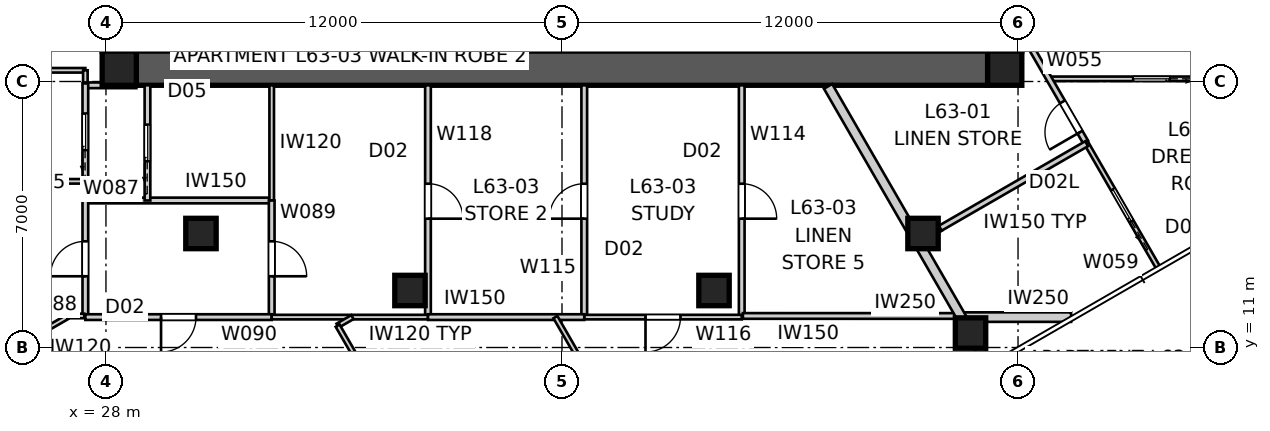
"""IFC4 building model, lengths in metres.
Left out: names, types, materials, properties, quantities, classifications, styles, units other than length and angle.
Written with IfcOpenShell. Run it as: python <this file> out.ifc"""

import sys

from ifc_helpers import new_model, si_unit, direction, frame, frame_2d, origin, origin_2d, place, context, subcontext, project, spatial, polyline, rectangle, outline, extrude, element, fill, save


model = new_model("IFC4")
c1 = context("Model", 3, precision=1e-05, world=origin(), true_north=direction((0.0, 1.0)))
c2 = subcontext(c1, "Body", "Model", "MODEL_VIEW")
j1 = project(units=[si_unit("LENGTHUNIT", "METRE"), si_unit("PLANEANGLEUNIT", "RADIAN")], contexts=[c1])
p1 = place(None, origin())
s1 = spatial("IfcSite", under=j1, at=p1, CompositionType="ELEMENT")
p2 = place(p1, origin())
s2 = spatial("IfcBuilding", under=s1, at=p2, CompositionType="ELEMENT")
p3 = place(p2, frame((0.0, 0.0, 228.6)))
s3 = spatial("IfcBuildingStorey", under=s2, at=p3, CompositionType="ELEMENT", Elevation=228.6)
p4 = place(p3, frame((51.2, 18.35, 0.0), z_axis=(0.0, 0.0, 1.0), x_axis=(-1.0, 0.0, 0.0)))
e1 = element("IfcWall", 1, at=p4, inside=s3, PredefinedType="SHEAR", context=c2, shape_type="SweptSolid", body=[
    extrude(outline(polyline([(0.0, -0.45), (22.4, -0.45), (22.4, -0.025), (22.85, -0.025), (22.85, 0.025), (22.4, 0.025), (22.4, 0.45), (0.0, 0.45), (0.0, 0.025), (-0.45, 0.025), (-0.45, -0.025), (0.0, -0.025), (0.0, -0.45)])), origin(), (0.0, 0.0, 1.0), 3.4),
])
p5 = place(p3, frame((51.65, 18.8, 0.0), z_axis=(0.0, 0.0, 1.0), x_axis=(0.0, 1.0, 0.0)))
e2 = element("IfcWall", 2, at=p5, inside=s3, PredefinedType="SHEAR", context=c2, shape_type="SweptSolid", body=[
    extrude(outline(polyline([(0.0, -0.45), (22.4, -0.45), (22.4, -0.025), (22.85, -0.025), (22.85, 0.025), (22.4, 0.025), (22.4, 0.45), (0.0, 0.45), (0.0, 0.025), (-0.45, 0.025), (-0.45, -0.025), (0.0, -0.025), (0.0, -0.45)])), origin(), (0.0, 0.0, 1.0), 3.4),
])
p6 = place(p5, frame((11.14, 0.0, 0.0)))
e3 = element("IfcOpeningElement", 3, at=p6, cuts=e2, PredefinedType="OPENING", context=c2, shape_type="SweptSolid", body=[
    extrude(rectangle(XDim=1.02, YDim=2.4, at=frame_2d((0.51, 1.2))), frame((0.0, 0.46, 0.0), z_axis=(0.0, -1.0, 0.0), x_axis=(1.0, 0.0, 0.0)), (0.0, 0.0, 1.0), 0.92),
])
p7 = place(p3, frame((28.35, 41.2, 0.0), z_axis=(0.0, 0.0, 1.0), x_axis=(0.0, -1.0, 0.0)))
e4 = element("IfcWall", 4, at=p7, inside=s3, PredefinedType="SHEAR", context=c2, shape_type="SweptSolid", body=[
    extrude(outline(polyline([(0.0, -0.45), (22.4, -0.45), (22.4, -0.025), (22.85, -0.025), (22.85, 0.025), (22.4, 0.025), (22.4, 0.45), (0.0, 0.45), (0.0, 0.025), (-0.45, 0.025), (-0.45, -0.025), (0.0, -0.025), (0.0, -0.45)])), origin(), (0.0, 0.0, 1.0), 3.4),
])
p8 = place(p7, frame((11.14, 0.0, 0.0)))
e5 = element("IfcOpeningElement", 5, at=p8, cuts=e4, PredefinedType="OPENING", context=c2, shape_type="SweptSolid", body=[
    extrude(rectangle(XDim=1.02, YDim=2.4, at=frame_2d((0.51, 1.2))), frame((0.0, 0.46, 0.0), z_axis=(0.0, -1.0, 0.0), x_axis=(1.0, 0.0, 0.0)), (0.0, 0.0, 1.0), 0.92),
])
for number, where, z_axis, x_axis in (
    (6, (28.35, 18.35, 0.0), (0.0, 0.0, 1.0), (1.0, 0.0, 0.0)),
    (7, (51.65, 18.35, 0.0), (0.0, 0.0, 1.0), (1.0, 0.0, 0.0)),
):
    element("IfcColumn", number, at=place(p3, frame(where, z_axis=z_axis, x_axis=x_axis)), inside=s3, PredefinedType="COLUMN", context=c2, shape_type="SweptSolid", body=[
        extrude(rectangle(XDim=0.9, YDim=0.9, at=origin_2d()), origin(), (0.0, 0.0, 1.0), 3.4),
    ])
for number, where, z_axis, x_axis in (
    (8, (50.75, 11.38, 0.0), (0.0, 0.0, 1.0), (1.0, 0.0, 0.0)),
    (9, (30.5, 14.0, 0.0), (0.0, 0.0, 1.0), (1.0, 0.0, 0.0)),
    (10, (36.0, 12.5, 0.0), (0.0, 0.0, 1.0), (1.0, 0.0, 0.0)),
    (11, (44.0, 12.5, 0.0), (0.0, 0.0, 1.0), (1.0, 0.0, 0.0)),
    (12, (49.5, 14.0, 0.0), (0.0, 0.0, 1.0), (1.0, 0.0, 0.0)),
):
    element("IfcColumn", number, at=place(p3, frame(where, z_axis=z_axis, x_axis=x_axis)), inside=s3, PredefinedType="COLUMN", context=c2, shape_type="SweptSolid", body=[
        extrude(rectangle(XDim=0.8, YDim=0.8, at=origin_2d()), origin(), (0.0, 0.0, 1.0), 3.4),
    ])
p9 = place(p3, frame((51.25, 10.514, 0.0), z_axis=(0.0, 0.0, 1.0), x_axis=(-0.500008511703, 0.866020489494, 0.0)))
e13 = element("IfcWall", 13, at=p9, inside=s3, PredefinedType="PARTITIONING", context=c2, shape_type="SweptSolid", body=[
    extrude(rectangle(XDim=8.496, YDim=0.25, at=frame_2d((4.248, 0.0))), origin(), (0.0, 0.0, 1.0), 3.25),
])
p10 = place(p3, frame((58.2, 18.07, 0.0), z_axis=(0.0, 0.0, 1.0), x_axis=(-1.0, 0.0, 0.0)))
e14 = element("IfcWall", 14, at=p10, inside=s3, PredefinedType="PARTITIONING", context=c2, shape_type="SweptSolid", body=[
    extrude(rectangle(XDim=5.381, YDim=0.12, at=frame_2d((2.691, 0.0))), origin(), (0.0, 0.0, 1.0), 3.25),
])
p11 = place(p10, frame((2.211, 0.0, 0.0)))
e15 = element("IfcOpeningElement", 15, at=p11, cuts=e14, PredefinedType="OPENING", context=c2, shape_type="SweptSolid", body=[
    extrude(rectangle(XDim=0.96, YDim=2.1, at=frame_2d((0.48, 1.05))), frame((0.0, 0.07, 0.0), z_axis=(0.0, -1.0, 0.0), x_axis=(1.0, 0.0, 0.0)), (0.0, 0.0, 1.0), 0.14),
])
p12 = place(p3, frame((53.779, 16.406, 0.0), z_axis=(0.0, 0.0, 1.0), x_axis=(-0.499969954228, 0.866042750024, 0.0)))
e16 = element("IfcWall", 16, at=p12, inside=s3, PredefinedType="SOLIDWALL", context=c2, shape_type="SweptSolid", body=[
    extrude(rectangle(XDim=3.359, YDim=0.15, at=frame_2d((1.679, 0.0))), origin(), (0.0, 0.0, 1.0), 3.25),
])
p13 = place(p12, frame((0.301, 0.0, 0.0)))
e17 = element("IfcOpeningElement", 17, at=p13, cuts=e16, PredefinedType="OPENING", context=c2, shape_type="SweptSolid", body=[
    extrude(rectangle(XDim=0.92, YDim=2.1, at=frame_2d((0.46, 1.05))), frame((0.0, 0.085, 0.0), z_axis=(0.0, -1.0, 0.0), x_axis=(1.0, 0.0, 0.0)), (0.0, 0.0, 1.0), 0.17),
])
p14 = place(p3, frame((55.678, 13.117, 0.0), z_axis=(0.0, 0.0, 1.0), x_axis=(-0.500024807712, 0.866011080572, 0.0)))
e18 = element("IfcWall", 18, at=p14, inside=s3, PredefinedType="PARTITIONING", context=c2, shape_type="SweptSolid", body=[
    extrude(rectangle(XDim=3.798, YDim=0.12, at=frame_2d((1.899, 0.0))), origin(), (0.0, 0.0, 1.0), 3.25),
])
p15 = place(p14, frame((1.399, 0.0, 0.0)))
e19 = element("IfcOpeningElement", 19, at=p15, cuts=e18, PredefinedType="OPENING", context=c2, shape_type="SweptSolid", body=[
    extrude(rectangle(XDim=0.96, YDim=2.1, at=frame_2d((0.48, 1.05))), frame((0.0, 0.07, 0.0), z_axis=(0.0, -1.0, 0.0), x_axis=(1.0, 0.0, 0.0)), (0.0, 0.0, 1.0), 0.14),
])
p16 = place(p3, frame((49.356, 13.795, 0.0), z_axis=(0.0, 0.0, 1.0), x_axis=(0.866038486578, 0.499977339252, 0.0)))
e20 = element("IfcWall", 20, at=p16, inside=s3, PredefinedType="SOLIDWALL", context=c2, shape_type="SweptSolid", body=[
    extrude(rectangle(XDim=0.691, YDim=0.15, at=frame_2d((0.345, 0.0))), origin(), (0.0, 0.0, 1.0), 2.25),
])
p17 = place(p3, frame((49.955, 14.14, 0.0), z_axis=(0.0, 0.0, 1.0), x_axis=(0.866017295027, 0.500014044516, 0.0)))
e21 = element("IfcWall", 21, at=p17, inside=s3, PredefinedType="SOLIDWALL", context=c2, shape_type="SweptSolid", body=[
    extrude(rectangle(XDim=4.445, YDim=0.15, at=frame_2d((2.223, 0.0))), origin(), (0.0, 0.0, 1.0), 3.25),
])
p18 = place(p3, frame((53.397, 11.8, 0.0), z_axis=(0.0, 0.0, 1.0), x_axis=(-1.0, 0.0, 0.0)))
e22 = element("IfcWall", 22, at=p18, inside=s3, PredefinedType="PARTITIONING", context=c2, shape_type="SweptSolid", body=[
    extrude(rectangle(XDim=2.889, YDim=0.25, at=frame_2d((1.444, 0.0))), origin(), (0.0, 0.0, 1.0), 3.25),
])
p19 = place(p3, frame((27.458, 18.295, 0.0), z_axis=(0.0, 0.0, 1.0), x_axis=(-1.0, 0.0, 0.0)))
e23 = element("IfcWall", 23, at=p19, inside=s3, PredefinedType="PARTITIONING", context=c2, shape_type="SweptSolid", body=[
    extrude(rectangle(XDim=5.658, YDim=0.12, at=frame_2d((2.829, 0.0))), origin(), (0.0, 0.0, 1.0), 3.25),
])
p20 = place(p3, frame((28.8, 17.9, 0.0), z_axis=(0.0, 0.0, 1.0), x_axis=(-1.0, 0.0, 0.0)))
e24 = element("IfcWall", 24, at=p20, inside=s3, PredefinedType="SOLIDWALL", context=c2, shape_type="SweptSolid", body=[
    extrude(rectangle(XDim=1.342, YDim=0.15, at=frame_2d((0.671, 0.0))), origin(), (0.0, 0.0, 1.0), 3.25),
])
p21 = place(p3, frame((32.361, 14.869, 0.0), z_axis=(0.0, 0.0, 1.0), x_axis=(-1.0, 0.0, 0.0)))
e25 = element("IfcWall", 25, at=p21, inside=s3, PredefinedType="SOLIDWALL", context=c2, shape_type="SweptSolid", body=[
    extrude(rectangle(XDim=4.903, YDim=0.15, at=frame_2d((2.452, 0.0))), origin(), (0.0, 0.0, 1.0), 3.25),
])
p22 = place(p3, frame((32.361, 17.9, 0.0), z_axis=(0.0, 0.0, 1.0), x_axis=(0.0, -1.0, 0.0)))
e26 = element("IfcWall", 26, at=p22, inside=s3, PredefinedType="PARTITIONING", context=c2, shape_type="SweptSolid", body=[
    extrude(rectangle(XDim=3.031, YDim=0.12, at=frame_2d((1.516, 0.0))), origin(), (0.0, 0.0, 1.0), 3.25),
])
p23 = place(p3, frame((29.092, 14.869, 0.0), z_axis=(0.0, 0.0, 1.0), x_axis=(0.0, 1.0, 0.0)))
e27 = element("IfcWall", 27, at=p23, inside=s3, PredefinedType="SOLIDWALL", context=c2, shape_type="SweptSolid", body=[
    extrude(rectangle(XDim=3.031, YDim=0.15, at=frame_2d((1.516, 0.0))), origin(), (0.0, 0.0, 1.0), 3.25),
])
p24 = place(p23, frame((1.036, 0.0, 0.0)))
e28 = element("IfcOpeningElement", 28, at=p24, cuts=e27, PredefinedType="OPENING", context=c2, shape_type="SweptSolid", body=[
    extrude(rectangle(XDim=0.96, YDim=2.1, at=frame_2d((0.48, 1.05))), frame((0.0, 0.085, 0.0), z_axis=(0.0, -1.0, 0.0), x_axis=(1.0, 0.0, 0.0)), (0.0, 0.0, 1.0), 0.17),
])
p25 = place(p3, frame((27.458, 11.8, 0.0), z_axis=(0.0, 0.0, 1.0), x_axis=(0.0, 1.0, 0.0)))
e29 = element("IfcWall", 29, at=p25, inside=s3, PredefinedType="SOLIDWALL", context=c2, shape_type="SweptSolid", body=[
    extrude(rectangle(XDim=6.15, YDim=0.15, at=frame_2d((3.075, 0.0))), origin(), (0.0, 0.0, 1.0), 3.25),
])
p26 = place(p25, frame((4.396, 0.0, 0.0)))
e30 = element("IfcOpeningElement", 30, at=p26, cuts=e29, PredefinedType="OPENING", context=c2, shape_type="SweptSolid", body=[
    extrude(rectangle(XDim=0.96, YDim=2.1, at=frame_2d((0.48, 1.05))), frame((0.0, 0.085, 0.0), z_axis=(0.0, -1.0, 0.0), x_axis=(1.0, 0.0, 0.0)), (0.0, 0.0, 1.0), 0.17),
])
p27 = place(p25, frame((1.074, 0.0, 0.0)))
e31 = element("IfcOpeningElement", 31, at=p27, cuts=e29, PredefinedType="OPENING", context=c2, shape_type="SweptSolid", body=[
    extrude(rectangle(XDim=0.92, YDim=2.34, at=frame_2d((0.46, 1.17))), frame((0.0, 0.085, 0.0), z_axis=(0.0, -1.0, 0.0), x_axis=(1.0, 0.0, 0.0)), (0.0, 0.0, 1.0), 0.17),
])
p28 = place(p3, frame((32.361, 14.869, 0.0), z_axis=(0.0, 0.0, 1.0), x_axis=(0.0, -1.0, 0.0)))
e32 = element("IfcWall", 32, at=p28, inside=s3, PredefinedType="SOLIDWALL", context=c2, shape_type="SweptSolid", body=[
    extrude(rectangle(XDim=3.069, YDim=0.15, at=frame_2d((1.534, 0.0))), origin(), (0.0, 0.0, 1.0), 3.25),
])
p29 = place(p28, frame((1.074, 0.0, 0.0)))
e33 = element("IfcOpeningElement", 33, at=p29, cuts=e32, PredefinedType="OPENING", context=c2, shape_type="SweptSolid", body=[
    extrude(rectangle(XDim=0.92, YDim=2.34, at=frame_2d((0.46, 1.17))), frame((0.0, 0.085, 0.0), z_axis=(0.0, -1.0, 0.0), x_axis=(1.0, 0.0, 0.0)), (0.0, 0.0, 1.0), 0.17),
])
p30 = place(p3, frame((32.361, 11.8, 0.0), z_axis=(0.0, 0.0, 1.0), x_axis=(-1.0, 0.0, 0.0)))
e34 = element("IfcWall", 34, at=p30, inside=s3, PredefinedType="SOLIDWALL", context=c2, shape_type="SweptSolid", body=[
    extrude(rectangle(XDim=4.903, YDim=0.15, at=frame_2d((2.452, 0.0))), origin(), (0.0, 0.0, 1.0), 3.25),
])
p31 = place(p30, frame((1.992, 0.0, 0.0)))
e35 = element("IfcOpeningElement", 35, at=p31, cuts=e34, PredefinedType="OPENING", context=c2, shape_type="SweptSolid", body=[
    extrude(rectangle(XDim=0.92, YDim=2.34, at=frame_2d((0.46, 1.17))), frame((0.0, 0.085, 0.0), z_axis=(0.0, -1.0, 0.0), x_axis=(1.0, 0.0, 0.0)), (0.0, 0.0, 1.0), 0.17),
])
p32 = place(p3, frame((22.51, 15.373, 0.0), z_axis=(0.0, 0.0, 1.0), x_axis=(1.0, 0.0, 0.0)))
e36 = element("IfcWall", 36, at=p32, inside=s3, PredefinedType="PARTITIONING", context=c2, shape_type="SweptSolid", body=[
    extrude(rectangle(XDim=4.918, YDim=0.12, at=frame_2d((2.459, 0.0))), origin(), (0.0, 0.0, 1.0), 3.25),
])
p33 = place(p32, frame((1.973, 0.0, 0.0)))
e37 = element("IfcOpeningElement", 37, at=p33, cuts=e36, PredefinedType="OPENING", context=c2, shape_type="SweptSolid", body=[
    extrude(rectangle(XDim=0.96, YDim=2.1, at=frame_2d((0.48, 1.05))), frame((0.0, 0.07, 0.0), z_axis=(0.0, -1.0, 0.0), x_axis=(1.0, 0.0, 0.0)), (0.0, 0.0, 1.0), 0.14),
])
p34 = place(p3, frame((27.428, 11.83, 0.0), z_axis=(0.0, 0.0, 1.0), x_axis=(-1.0, 0.0, 0.0)))
e38 = element("IfcWall", 38, at=p34, inside=s3, PredefinedType="PARTITIONING", context=c2, shape_type="SweptSolid", body=[
    extrude(rectangle(XDim=0.421, YDim=0.12, at=frame_2d((0.211, 0.0))), origin(), (0.0, 0.0, 1.0), 3.25),
])
p35 = place(p3, frame((26.976, 11.8, 0.0), z_axis=(0.0, 0.0, 1.0), x_axis=(-0.866046860819, -0.499962833484, 0.0)))
e39 = element("IfcWall", 39, at=p35, inside=s3, PredefinedType="PARTITIONING", context=c2, shape_type="SweptSolid", body=[
    extrude(rectangle(XDim=2.081, YDim=0.12, at=frame_2d((1.041, 0.0))), origin(), (0.0, 0.0, 1.0), 3.25),
])
p36 = place(p3, frame((44.729, 17.9, 0.0), z_axis=(0.0, 0.0, 1.0), x_axis=(0.0, -1.0, 0.0)))
e40 = element("IfcWall", 40, at=p36, inside=s3, PredefinedType="SOLIDWALL", context=c2, shape_type="SweptSolid", body=[
    extrude(rectangle(XDim=6.1, YDim=0.15, at=frame_2d((3.05, 0.0))), origin(), (0.0, 0.0, 1.0), 3.25),
])
p37 = place(p36, frame((2.59, 0.0, 0.0)))
e41 = element("IfcOpeningElement", 41, at=p37, cuts=e40, PredefinedType="OPENING", context=c2, shape_type="SweptSolid", body=[
    extrude(rectangle(XDim=0.92, YDim=2.34, at=frame_2d((0.46, 1.17))), frame((0.0, 0.085, 0.0), z_axis=(0.0, -1.0, 0.0), x_axis=(1.0, 0.0, 0.0)), (0.0, 0.0, 1.0), 0.17),
])
p38 = place(p3, frame((40.586, 11.8, 0.0), z_axis=(0.0, 0.0, 1.0), x_axis=(0.0, 1.0, 0.0)))
e42 = element("IfcWall", 42, at=p38, inside=s3, PredefinedType="SOLIDWALL", context=c2, shape_type="SweptSolid", body=[
    extrude(rectangle(XDim=6.1, YDim=0.15, at=frame_2d((3.05, 0.0))), origin(), (0.0, 0.0, 1.0), 3.25),
])
p39 = place(p38, frame((2.59, 0.0, 0.0)))
e43 = element("IfcOpeningElement", 43, at=p39, cuts=e42, PredefinedType="OPENING", context=c2, shape_type="SweptSolid", body=[
    extrude(rectangle(XDim=0.92, YDim=2.34, at=frame_2d((0.46, 1.17))), frame((0.0, 0.085, 0.0), z_axis=(0.0, -1.0, 0.0), x_axis=(1.0, 0.0, 0.0)), (0.0, 0.0, 1.0), 0.17),
])
p40 = place(p3, frame((44.729, 11.8, 0.0), z_axis=(0.0, 0.0, 1.0), x_axis=(-1.0, 0.0, 0.0)))
e44 = element("IfcWall", 44, at=p40, inside=s3, PredefinedType="PARTITIONING", context=c2, shape_type="SweptSolid", body=[
    extrude(rectangle(XDim=4.144, YDim=0.12, at=frame_2d((2.072, 0.0))), origin(), (0.0, 0.0, 1.0), 3.25),
])
p41 = place(p40, frame((1.612, 0.0, 0.0)))
e45 = element("IfcOpeningElement", 45, at=p41, cuts=e44, PredefinedType="OPENING", context=c2, shape_type="SweptSolid", body=[
    extrude(rectangle(XDim=0.92, YDim=2.34, at=frame_2d((0.46, 1.17))), frame((0.0, 0.07, 0.0), z_axis=(0.0, -1.0, 0.0), x_axis=(1.0, 0.0, 0.0)), (0.0, 0.0, 1.0), 0.14),
])
p42 = place(p3, frame((50.491, 11.829, 0.0), z_axis=(0.0, 0.0, 1.0), x_axis=(-0.999999991834, 0.000127795526, 0.0)))
e46 = element("IfcWall", 46, at=p42, inside=s3, PredefinedType="SOLIDWALL", context=c2, shape_type="SweptSolid", body=[
    extrude(rectangle(XDim=5.731, YDim=0.15, at=frame_2d((2.866, 0.0))), origin(), (0.0, 0.0, 1.0), 3.25),
])
p43 = place(p3, frame((36.474, 17.9, 0.0), z_axis=(0.0, 0.0, 1.0), x_axis=(0.0, -1.0, 0.0)))
e47 = element("IfcWall", 47, at=p43, inside=s3, PredefinedType="SOLIDWALL", context=c2, shape_type="SweptSolid", body=[
    extrude(rectangle(XDim=6.1, YDim=0.15, at=frame_2d((3.05, 0.0))), origin(), (0.0, 0.0, 1.0), 3.25),
])
p44 = place(p43, frame((2.59, 0.0, 0.0)))
e48 = element("IfcOpeningElement", 48, at=p44, cuts=e47, PredefinedType="OPENING", context=c2, shape_type="SweptSolid", body=[
    extrude(rectangle(XDim=0.92, YDim=2.34, at=frame_2d((0.46, 1.17))), frame((0.0, 0.085, 0.0), z_axis=(0.0, -1.0, 0.0), x_axis=(1.0, 0.0, 0.0)), (0.0, 0.0, 1.0), 0.17),
])
p45 = place(p3, frame((36.474, 11.8, 0.0), z_axis=(0.0, 0.0, 1.0), x_axis=(-1.0, 0.0, 0.0)))
e49 = element("IfcWall", 49, at=p45, inside=s3, PredefinedType="PARTITIONING", context=c2, shape_type="SweptSolid", body=[
    extrude(rectangle(XDim=4.112, YDim=0.12, at=frame_2d((2.056, 0.0))), origin(), (0.0, 0.0, 1.0), 3.25),
])
p46 = place(p3, frame((40.586, 11.8, 0.0), z_axis=(0.0, 0.0, 1.0), x_axis=(-1.0, 0.0, 0.0)))
e50 = element("IfcWall", 50, at=p46, inside=s3, PredefinedType="SOLIDWALL", context=c2, shape_type="SweptSolid", body=[
    extrude(rectangle(XDim=4.112, YDim=0.15, at=frame_2d((2.056, 0.0))), origin(), (0.0, 0.0, 1.0), 3.25),
])
p47 = place(p3, frame((34.486, 11.8, 0.0), z_axis=(0.0, 0.0, 1.0), x_axis=(-0.865896406789, -0.500223362819, 0.0)))
e51 = element("IfcWall", 51, at=p47, inside=s3, PredefinedType="PARTITIONING", context=c2, shape_type="SweptSolid", body=[
    extrude(rectangle(XDim=0.45, YDim=0.12, at=frame_2d((0.225, 0.0))), origin(), (0.0, 0.0, 1.0), 3.25),
])
p48 = place(p3, frame((34.097, 11.575, 0.0), z_axis=(0.0, 0.0, 1.0), x_axis=(0.49999364752, -0.86602907136, 0.0)))
e52 = element("IfcWall", 52, at=p48, inside=s3, PredefinedType="PARTITIONING", context=c2, shape_type="SweptSolid", body=[
    extrude(rectangle(XDim=9.455, YDim=0.12, at=frame_2d((4.728, 0.0))), origin(), (0.0, 0.0, 1.0), 3.25),
])
p49 = place(p48, frame((4.288, 0.0, 0.0)))
e53 = element("IfcOpeningElement", 53, at=p49, cuts=e52, PredefinedType="OPENING", context=c2, shape_type="SweptSolid", body=[
    extrude(rectangle(XDim=0.92, YDim=2.34, at=frame_2d((0.46, 1.17))), frame((0.0, 0.07, 0.0), z_axis=(0.0, -1.0, 0.0), x_axis=(1.0, 0.0, 0.0)), (0.0, 0.0, 1.0), 0.14),
])
p50 = place(p3, frame((43.219, 5.924, 0.0), z_axis=(0.0, 0.0, 1.0), x_axis=(-0.500009005995, 0.866020204108, 0.0)))
e54 = element("IfcWall", 54, at=p50, inside=s3, PredefinedType="PARTITIONING", context=c2, shape_type="SweptSolid", body=[
    extrude(rectangle(XDim=6.785, YDim=0.12, at=frame_2d((3.393, 0.0))), origin(), (0.0, 0.0, 1.0), 3.25),
])
p51 = place(p3, frame((27.458, 18.295, 0.0), z_axis=(0.0, 0.0, 1.0), x_axis=(0.0, -1.0, 0.0)))
e55 = element("IfcWall", 55, at=p51, inside=s3, PredefinedType="PARTITIONING", context=c2, shape_type="SweptSolid", body=[
    extrude(rectangle(XDim=0.345, YDim=0.12, at=frame_2d((0.172, 0.0))), origin(), (0.0, 0.0, 1.0), 3.25),
])
p52 = place(p11, origin())
e56 = element("IfcDoor", 56, at=p52, inside=s3, OperationType="SLIDING_TO_LEFT", PredefinedType="DOOR", context=c2, shape_type="SweptSolid", body=[
    extrude(rectangle(XDim=0.96, YDim=2.1, at=frame_2d((0.48, 1.05))), frame((0.0, 0.025, 0.0), z_axis=(0.0, -1.0, 0.0), x_axis=(1.0, 0.0, 0.0)), (0.0, 0.0, 1.0), 0.05),
])
fill(e15, e56)
p53 = place(p15, origin())
e57 = element("IfcDoor", 57, at=p53, inside=s3, OperationType="SLIDING_TO_LEFT", PredefinedType="DOOR", context=c2, shape_type="SweptSolid", body=[
    extrude(rectangle(XDim=0.96, YDim=2.1, at=frame_2d((0.48, 1.05))), frame((0.0, 0.025, 0.0), z_axis=(0.0, -1.0, 0.0), x_axis=(1.0, 0.0, 0.0)), (0.0, 0.0, 1.0), 0.05),
])
fill(e19, e57)
p54 = place(p13, origin())
e58 = element("IfcDoor", 58, at=p54, inside=s3, OperationType="SINGLE_SWING_LEFT", PredefinedType="DOOR", context=c2, shape_type="SweptSolid", body=[
    extrude(rectangle(XDim=0.92, YDim=2.1, at=frame_2d((0.46, 1.05))), frame((0.0, 0.025, 0.0), z_axis=(0.0, -1.0, 0.0), x_axis=(1.0, 0.0, 0.0)), (0.0, 0.0, 1.0), 0.05),
])
fill(e17, e58)
p55 = place(p26, origin())
e59 = element("IfcDoor", 59, at=p55, inside=s3, OperationType="SLIDING_TO_LEFT", PredefinedType="DOOR", context=c2, shape_type="SweptSolid", body=[
    extrude(rectangle(XDim=0.96, YDim=2.1, at=frame_2d((0.48, 1.05))), frame((0.0, 0.025, 0.0), z_axis=(0.0, -1.0, 0.0), x_axis=(1.0, 0.0, 0.0)), (0.0, 0.0, 1.0), 0.05),
])
fill(e30, e59)
p56 = place(p27, origin())
e60 = element("IfcDoor", 60, at=p56, inside=s3, OperationType="SINGLE_SWING_LEFT", PredefinedType="DOOR", context=c2, shape_type="SweptSolid", body=[
    extrude(rectangle(XDim=0.92, YDim=2.34, at=frame_2d((0.46, 1.17))), frame((0.0, 0.025, 0.0), z_axis=(0.0, -1.0, 0.0), x_axis=(1.0, 0.0, 0.0)), (0.0, 0.0, 1.0), 0.05),
])
fill(e31, e60)
p57 = place(p24, origin())
e61 = element("IfcDoor", 61, at=p57, inside=s3, OperationType="SLIDING_TO_LEFT", PredefinedType="DOOR", context=c2, shape_type="SweptSolid", body=[
    extrude(rectangle(XDim=0.96, YDim=2.1, at=frame_2d((0.48, 1.05))), frame((0.0, 0.025, 0.0), z_axis=(0.0, -1.0, 0.0), x_axis=(1.0, 0.0, 0.0)), (0.0, 0.0, 1.0), 0.05),
])
fill(e28, e61)
p58 = place(p31, origin())
e62 = element("IfcDoor", 62, at=p58, inside=s3, OperationType="SINGLE_SWING_RIGHT", PredefinedType="DOOR", context=c2, shape_type="SweptSolid", body=[
    extrude(rectangle(XDim=0.92, YDim=2.34, at=frame_2d((0.46, 1.17))), frame((0.0, 0.025, 0.0), z_axis=(0.0, -1.0, 0.0), x_axis=(1.0, 0.0, 0.0)), (0.0, 0.0, 1.0), 0.05),
])
fill(e35, e62)
p59 = place(p29, origin())
e63 = element("IfcDoor", 63, at=p59, inside=s3, OperationType="SINGLE_SWING_RIGHT", PredefinedType="DOOR", context=c2, shape_type="SweptSolid", body=[
    extrude(rectangle(XDim=0.92, YDim=2.34, at=frame_2d((0.46, 1.17))), frame((0.0, 0.025, 0.0), z_axis=(0.0, -1.0, 0.0), x_axis=(1.0, 0.0, 0.0)), (0.0, 0.0, 1.0), 0.05),
])
fill(e33, e63)
p60 = place(p44, origin())
e64 = element("IfcDoor", 64, at=p60, inside=s3, OperationType="SINGLE_SWING_RIGHT", PredefinedType="DOOR", context=c2, shape_type="SweptSolid", body=[
    extrude(rectangle(XDim=0.92, YDim=2.34, at=frame_2d((0.46, 1.17))), frame((0.0, 0.025, 0.0), z_axis=(0.0, -1.0, 0.0), x_axis=(1.0, 0.0, 0.0)), (0.0, 0.0, 1.0), 0.05),
])
fill(e48, e64)
p61 = place(p39, origin())
e65 = element("IfcDoor", 65, at=p61, inside=s3, OperationType="SINGLE_SWING_LEFT", PredefinedType="DOOR", context=c2, shape_type="SweptSolid", body=[
    extrude(rectangle(XDim=0.92, YDim=2.34, at=frame_2d((0.46, 1.17))), frame((0.0, 0.025, 0.0), z_axis=(0.0, -1.0, 0.0), x_axis=(1.0, 0.0, 0.0)), (0.0, 0.0, 1.0), 0.05),
])
fill(e43, e65)
p62 = place(p37, origin())
e66 = element("IfcDoor", 66, at=p62, inside=s3, OperationType="SINGLE_SWING_RIGHT", PredefinedType="DOOR", context=c2, shape_type="SweptSolid", body=[
    extrude(rectangle(XDim=0.92, YDim=2.34, at=frame_2d((0.46, 1.17))), frame((0.0, 0.025, 0.0), z_axis=(0.0, -1.0, 0.0), x_axis=(1.0, 0.0, 0.0)), (0.0, 0.0, 1.0), 0.05),
])
fill(e41, e66)
p63 = place(p41, origin())
e67 = element("IfcDoor", 67, at=p63, inside=s3, OperationType="SINGLE_SWING_RIGHT", PredefinedType="DOOR", context=c2, shape_type="SweptSolid", body=[
    extrude(rectangle(XDim=0.92, YDim=2.34, at=frame_2d((0.46, 1.17))), frame((0.0, 0.025, 0.0), z_axis=(0.0, -1.0, 0.0), x_axis=(1.0, 0.0, 0.0)), (0.0, 0.0, 1.0), 0.05),
])
fill(e45, e67)
save(model, sys.argv[1])
